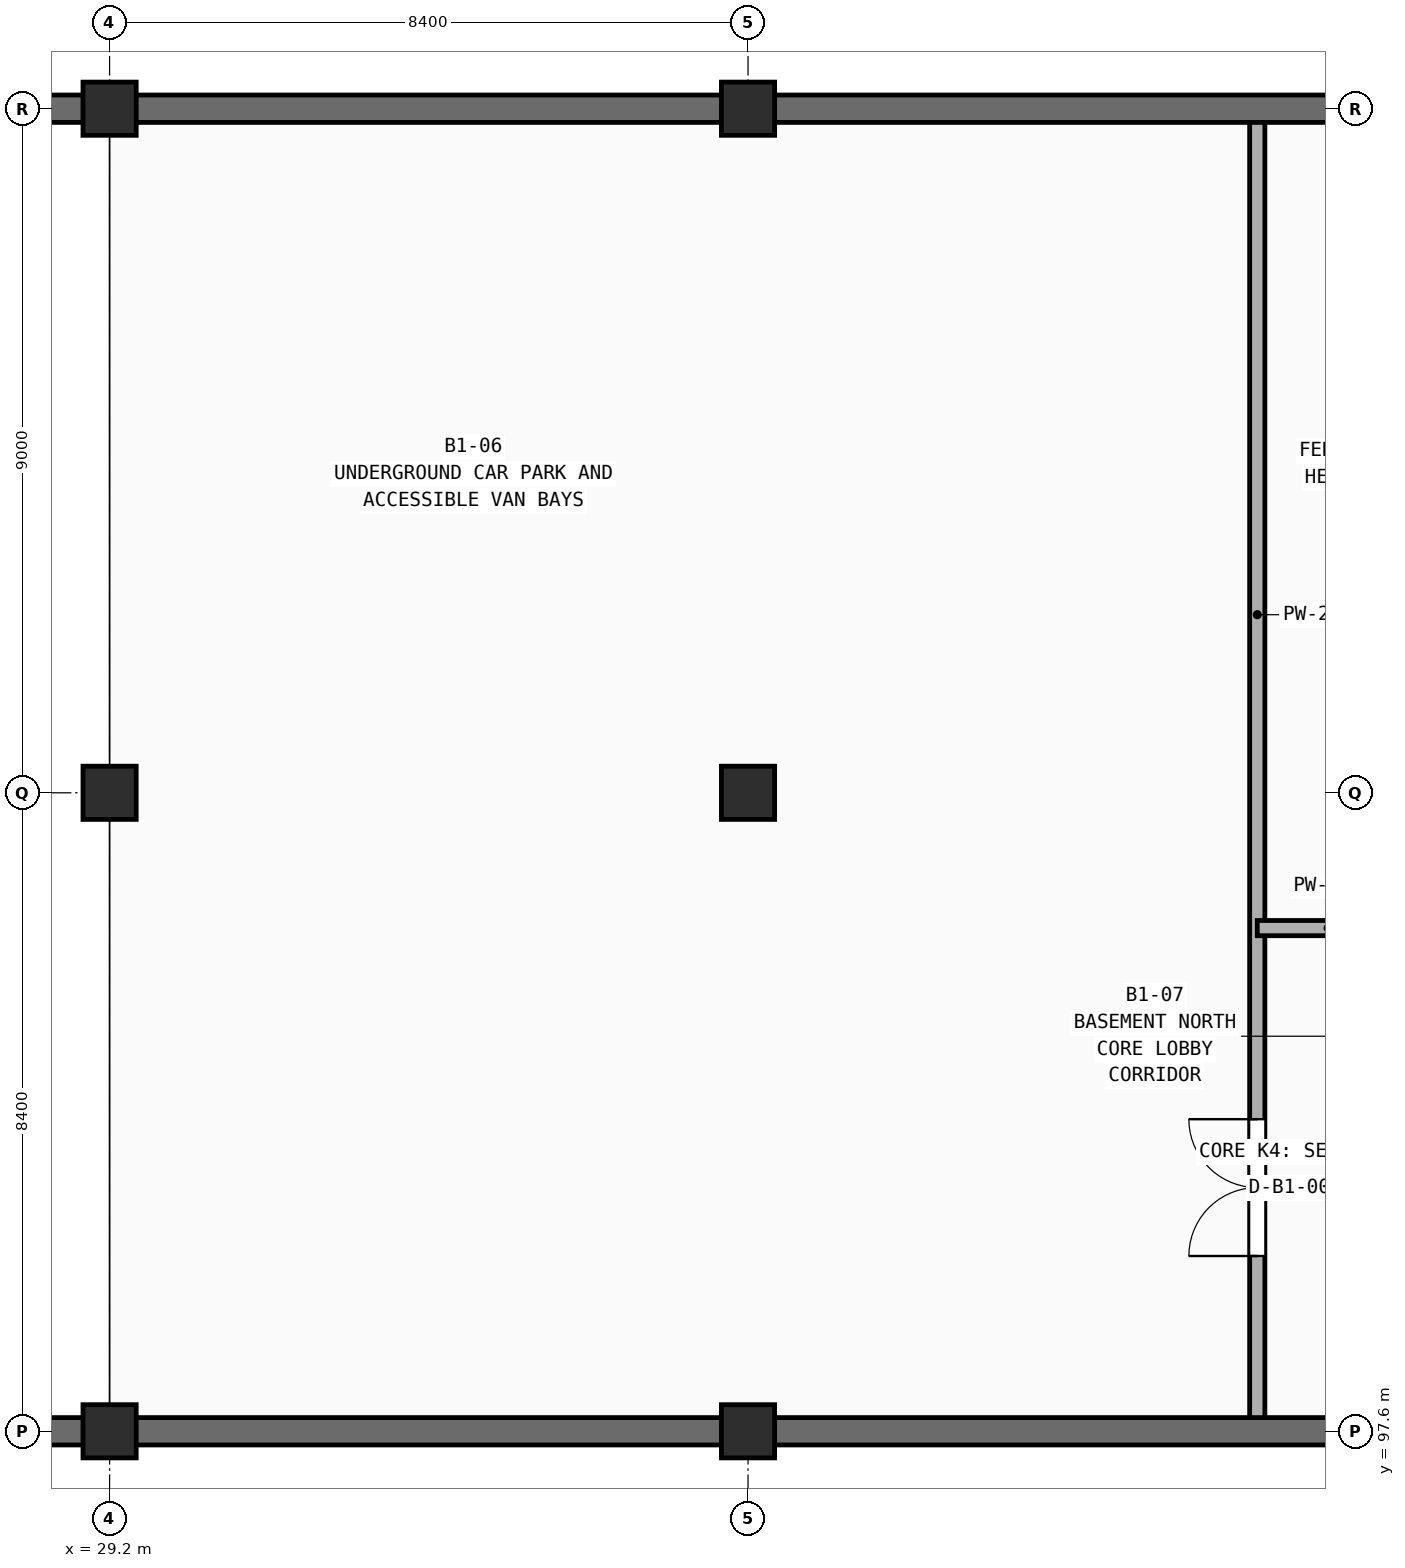
"""IFC4 building model, lengths in metres.
Left out: names, types, materials, properties, quantities, classifications, styles, units other than length and angle.
Written with IfcOpenShell. Run it as: python <this file> out.ifc"""

import sys

from ifc_helpers import new_model, si_unit, direction, frame, frame_2d, origin, origin_2d, place, context, subcontext, project, spatial, rectangle, extrude, element, fill, save


model = new_model("IFC4")
c1 = context("Model", 3, precision=1e-05, world=origin(), true_north=direction((0.0, 1.0)))
c2 = subcontext(c1, "Body", "Model", "MODEL_VIEW")
j1 = project(units=[si_unit("LENGTHUNIT", "METRE"), si_unit("PLANEANGLEUNIT", "RADIAN")], contexts=[c1])
p1 = place(None, origin())
s1 = spatial("IfcSite", under=j1, at=p1, CompositionType="ELEMENT")
p2 = place(p1, origin())
s2 = spatial("IfcBuilding", under=s1, at=p2, CompositionType="ELEMENT")
p3 = place(p2, frame((0.0, 0.0, -4.2)))
s3 = spatial("IfcBuildingStorey", under=s2, at=p3, CompositionType="ELEMENT", Elevation=-4.2)
for number, where, z_axis, x_axis in (
    (1, (29.2, 97.6, 0.0), (0.0, 0.0, 1.0), (1.0, 0.0, 0.0)),
    (2, (29.2, 106.0, 0.0), (0.0, 0.0, 1.0), (1.0, 0.0, 0.0)),
    (3, (29.2, 115.0, 0.0), (0.0, 0.0, 1.0), (1.0, 0.0, 0.0)),
    (4, (37.6, 97.6, 0.0), (0.0, 0.0, 1.0), (1.0, 0.0, 0.0)),
    (5, (37.6, 106.0, 0.0), (0.0, 0.0, 1.0), (1.0, 0.0, 0.0)),
    (6, (37.6, 115.0, 0.0), (0.0, 0.0, 1.0), (1.0, 0.0, 0.0)),
):
    element("IfcColumn", number, at=place(p3, frame(where, z_axis=z_axis, x_axis=x_axis)), inside=s3, PredefinedType="COLUMN", context=c2, shape_type="SweptSolid", body=[
        extrude(rectangle(XDim=0.7, YDim=0.7, at=origin_2d()), origin(), (0.0, 0.0, 1.0), 4.2),
    ])
p4 = place(p3, frame((44.3, 97.77, 0.0), z_axis=(0.0, 0.0, 1.0), x_axis=(0.0, 1.0, 0.0)))
e7 = element("IfcWall", 7, at=p4, inside=s3, PredefinedType="PARTITIONING", context=c2, shape_type="SweptSolid", body=[
    extrude(rectangle(XDim=17.06, YDim=0.2, at=frame_2d((8.53, 0.0))), origin(), (0.0, 0.0, 1.0), 3.44),
])
p5 = place(p4, frame((2.136, 0.0, -0.01)))
e8 = element("IfcOpeningElement", 8, at=p5, cuts=e7, PredefinedType="OPENING", context=c2, shape_type="SweptSolid", body=[
    extrude(rectangle(XDim=1.8, YDim=2.26, at=frame_2d((0.9, 1.13))), frame((0.0, 0.11, 0.0), z_axis=(0.0, -1.0, 0.0), x_axis=(1.0, 0.0, 0.0)), (0.0, 0.0, 1.0), 0.22),
])
p6 = place(p3, frame((44.3, 104.22, 0.0), z_axis=(0.0, 0.0, 1.0), x_axis=(1.0, 0.0, 0.0)))
e9 = element("IfcWall", 9, at=p6, inside=s3, PredefinedType="PARTITIONING", context=c2, shape_type="SweptSolid", body=[
    extrude(rectangle(XDim=4.0, YDim=0.2, at=frame_2d((2.0, 0.0))), origin(), (0.0, 0.0, 1.0), 3.54),
])
p7 = place(p6, frame((2.016, 0.0, -0.01)))
e10 = element("IfcOpeningElement", 10, at=p7, cuts=e9, PredefinedType="OPENING", context=c2, shape_type="SweptSolid", body=[
    extrude(rectangle(XDim=1.2, YDim=2.21, at=frame_2d((0.6, 1.105))), frame((0.0, 0.11, 0.0), z_axis=(0.0, -1.0, 0.0), x_axis=(1.0, 0.0, 0.0)), (0.0, 0.0, 1.0), 0.22),
])
p8 = place(p3, frame((20.8, 97.6, -0.4), z_axis=(0.0, 0.0, 1.0), x_axis=(1.0, 0.0, 0.0)))
e11 = element("IfcWall", 11, at=p8, inside=s3, PredefinedType="SOLIDWALL", context=c2, shape_type="SweptSolid", body=[
    extrude(rectangle(XDim=8.4, YDim=0.36, at=frame_2d((4.2, 0.0))), origin(), (0.0, 0.0, 1.0), 3.94),
])
p9 = place(p3, frame((29.2, 97.6, 0.0), z_axis=(0.0, 0.0, 1.0), x_axis=(1.0, 0.0, 0.0)))
e12 = element("IfcWall", 12, at=p9, inside=s3, PredefinedType="SOLIDWALL", context=c2, shape_type="SweptSolid", body=[
    extrude(rectangle(XDim=8.4, YDim=0.36, at=frame_2d((4.2, 0.0))), origin(), (0.0, 0.0, 1.0), 3.54),
])
p10 = place(p3, frame((37.6, 97.6, 0.0), z_axis=(0.0, 0.0, 1.0), x_axis=(1.0, 0.0, 0.0)))
e13 = element("IfcWall", 13, at=p10, inside=s3, PredefinedType="SOLIDWALL", context=c2, shape_type="SweptSolid", body=[
    extrude(rectangle(XDim=8.4, YDim=0.36, at=frame_2d((4.2, 0.0))), origin(), (0.0, 0.0, 1.0), 3.54),
])
p11 = place(p3, frame((20.8, 115.0, -0.4), z_axis=(0.0, 0.0, 1.0), x_axis=(1.0, 0.0, 0.0)))
e14 = element("IfcWall", 14, at=p11, inside=s3, PredefinedType="SOLIDWALL", context=c2, shape_type="SweptSolid", body=[
    extrude(rectangle(XDim=8.4, YDim=0.36, at=frame_2d((4.2, 0.0))), origin(), (0.0, 0.0, 1.0), 3.94),
])
p12 = place(p3, frame((29.2, 115.0, 0.0), z_axis=(0.0, 0.0, 1.0), x_axis=(1.0, 0.0, 0.0)))
e15 = element("IfcWall", 15, at=p12, inside=s3, PredefinedType="SOLIDWALL", context=c2, shape_type="SweptSolid", body=[
    extrude(rectangle(XDim=8.4, YDim=0.36, at=frame_2d((4.2, 0.0))), origin(), (0.0, 0.0, 1.0), 3.54),
])
p13 = place(p3, frame((37.6, 115.0, 0.0), z_axis=(0.0, 0.0, 1.0), x_axis=(1.0, 0.0, 0.0)))
e16 = element("IfcWall", 16, at=p13, inside=s3, PredefinedType="SOLIDWALL", context=c2, shape_type="SweptSolid", body=[
    extrude(rectangle(XDim=8.4, YDim=0.36, at=frame_2d((4.2, 0.0))), origin(), (0.0, 0.0, 1.0), 3.54),
])
p14 = place(p5, frame((1.8, 0.0, 0.01), z_axis=(0.0, 0.0, 1.0), x_axis=(-1.0, 0.0, 0.0)))
e17 = element("IfcDoor", 17, at=p14, inside=s3, OperationType="DOUBLE_SWING_LEFT", PredefinedType="DOOR", context=c2, shape_type="SweptSolid", body=[
    extrude(rectangle(XDim=1.8, YDim=2.25, at=frame_2d((0.9, 1.125))), frame((0.0, 0.025, 0.0), z_axis=(0.0, -1.0, 0.0), x_axis=(1.0, 0.0, 0.0)), (0.0, 0.0, 1.0), 0.05),
])
fill(e8, e17)
save(model, sys.argv[1])
